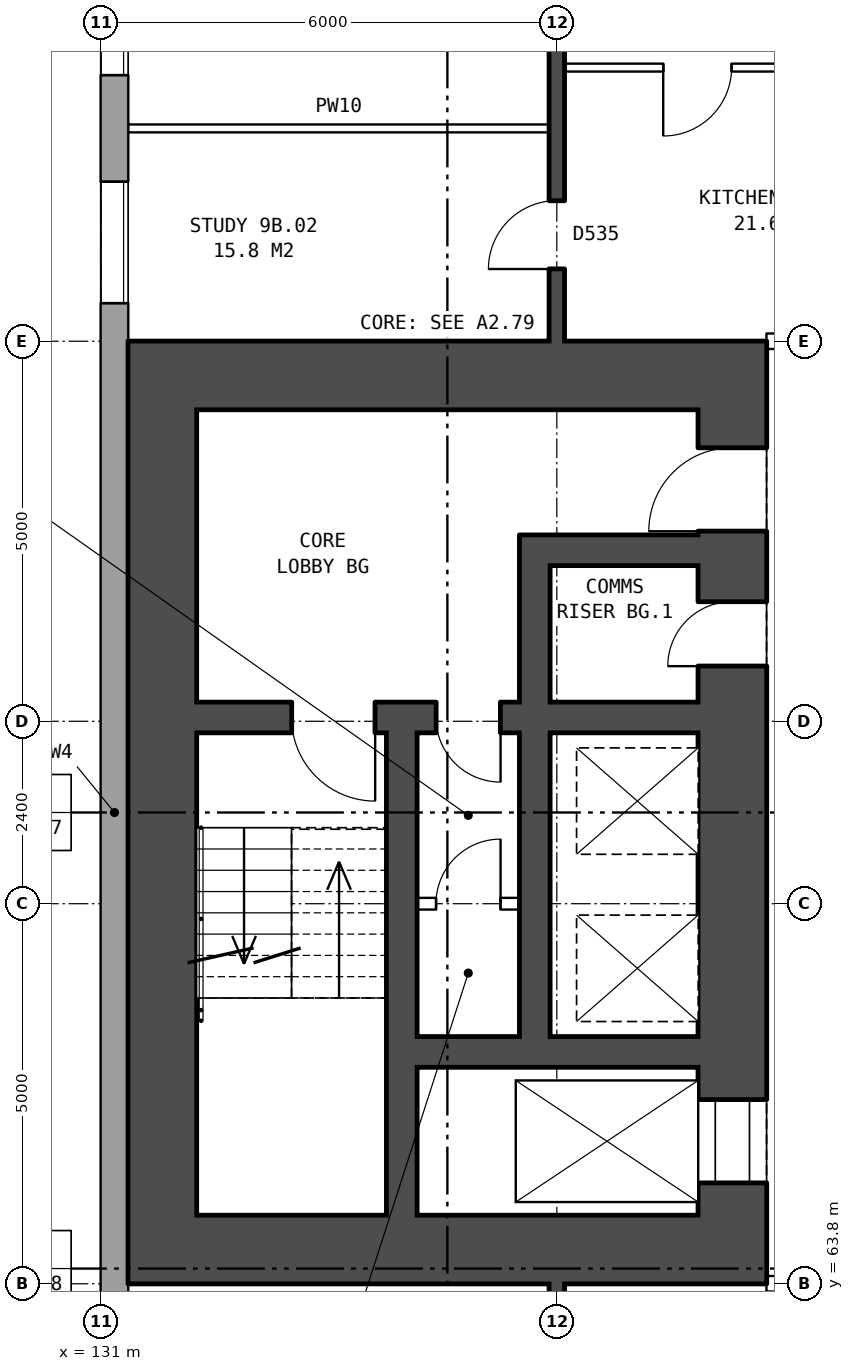
"""IFC4 building model, lengths in metres.
Left out: names, types, materials, properties, quantities, classifications, styles, units other than length and angle.
Written with IfcOpenShell. Run it as: python <this file> out.ifc"""

import sys

from ifc_helpers import new_model, si_unit, direction, frame, frame_2d, origin, place, context, subcontext, project, spatial, rectangle, extrude, element, fill, save


model = new_model("IFC4")
c1 = context("Model", 3, precision=1e-05, world=origin(), true_north=direction((0.0, 1.0)))
c2 = subcontext(c1, "Body", "Model", "MODEL_VIEW")
j1 = project(units=[si_unit("LENGTHUNIT", "METRE"), si_unit("PLANEANGLEUNIT", "RADIAN")], contexts=[c1])
p1 = place(None, origin())
s1 = spatial("IfcSite", under=j1, at=p1, CompositionType="ELEMENT")
p2 = place(p1, origin())
s2 = spatial("IfcBuilding", under=s1, at=p2, CompositionType="ELEMENT")
p3 = place(p2, frame((0.0, 0.0, 35.0)))
s3 = spatial("IfcBuildingStorey", under=s2, at=p3, CompositionType="ELEMENT", Elevation=35.0)
p4 = place(p3, frame((131.18, 82.925, 0.0), z_axis=(0.0, 0.0, 1.0), x_axis=(0.0, -1.0, 0.0)))
e1 = element("IfcWall", 1, at=p4, inside=s3, PredefinedType="STANDARD", context=c2, shape_type="SweptSolid", body=[
    extrude(rectangle(XDim=25.851, YDim=0.36, at=frame_2d((12.925, 0.0))), origin(), (0.0, 0.0, 1.0), 2.85),
])
p5 = place(p4, frame((1.625, 0.0, 0.8)))
e2 = element("IfcOpeningElement", 2, at=p5, cuts=e1, PredefinedType="OPENING", context=c2, shape_type="SweptSolid", body=[
    extrude(rectangle(XDim=1.6, YDim=1.8, at=frame_2d((0.8, 0.9))), frame((0.0, 0.19, 0.0), z_axis=(0.0, -1.0, 0.0), x_axis=(1.0, 0.0, 0.0)), (0.0, 0.0, 1.0), 0.38),
])
p6 = place(p4, frame((4.625, 0.0, 0.8)))
e3 = element("IfcOpeningElement", 3, at=p6, cuts=e1, PredefinedType="OPENING", context=c2, shape_type="SweptSolid", body=[
    extrude(rectangle(XDim=1.6, YDim=1.8, at=frame_2d((0.8, 0.9))), frame((0.0, 0.19, 0.0), z_axis=(0.0, -1.0, 0.0), x_axis=(1.0, 0.0, 0.0)), (0.0, 0.0, 1.0), 0.38),
])
p7 = place(p4, frame((19.625, 0.0, 0.8)))
e4 = element("IfcOpeningElement", 4, at=p7, cuts=e1, PredefinedType="OPENING", context=c2, shape_type="SweptSolid", body=[
    extrude(rectangle(XDim=1.6, YDim=1.8, at=frame_2d((0.8, 0.9))), frame((0.0, 0.19, 0.0), z_axis=(0.0, -1.0, 0.0), x_axis=(1.0, 0.0, 0.0)), (0.0, 0.0, 1.0), 0.38),
])
p8 = place(p4, frame((22.625, 0.0, 0.8)))
e5 = element("IfcOpeningElement", 5, at=p8, cuts=e1, PredefinedType="OPENING", context=c2, shape_type="SweptSolid", body=[
    extrude(rectangle(XDim=1.6, YDim=1.8, at=frame_2d((0.8, 0.9))), frame((0.0, 0.19, 0.0), z_axis=(0.0, -1.0, 0.0), x_axis=(1.0, 0.0, 0.0)), (0.0, 0.0, 1.0), 0.38),
])
p9 = place(p3, frame((139.31, 64.7, 0.0), z_axis=(0.0, 0.0, 1.0), x_axis=(0.0, 1.0, 0.0)))
e6 = element("IfcWall", 6, at=p9, inside=s3, PredefinedType="SHEAR", context=c2, shape_type="SweptSolid", body=[
    extrude(rectangle(XDim=10.6, YDim=0.9, at=frame_2d((5.3, 0.0))), origin(), (0.0, 0.0, 1.0), 2.85),
])
p10 = place(p9, frame((0.425, 0.0, 0.0)))
e7 = element("IfcOpeningElement", 7, at=p10, cuts=e6, PredefinedType="OPENING", context=c2, shape_type="SweptSolid", body=[
    extrude(rectangle(XDim=1.1, YDim=2.1, at=frame_2d((0.55, 1.05))), frame((0.0, 0.46, 0.0), z_axis=(0.0, -1.0, 0.0), x_axis=(1.0, 0.0, 0.0)), (0.0, 0.0, 1.0), 0.92),
])
p11 = place(p9, frame((9.0, 0.0, 0.0)))
e8 = element("IfcOpeningElement", 8, at=p11, cuts=e6, PredefinedType="OPENING", context=c2, shape_type="SweptSolid", body=[
    extrude(rectangle(XDim=1.1, YDim=2.1, at=frame_2d((0.55, 1.05))), frame((0.0, 0.46, 0.0), z_axis=(0.0, -1.0, 0.0), x_axis=(1.0, 0.0, 0.0)), (0.0, 0.0, 1.0), 0.92),
])
p12 = place(p9, frame((7.225, 0.0, 0.0)))
e9 = element("IfcOpeningElement", 9, at=p12, cuts=e6, PredefinedType="OPENING", context=c2, shape_type="SweptSolid", body=[
    extrude(rectangle(XDim=0.85, YDim=2.1, at=frame_2d((0.425, 1.05))), frame((0.0, 0.46, 0.0), z_axis=(0.0, -1.0, 0.0), x_axis=(1.0, 0.0, 0.0)), (0.0, 0.0, 1.0), 0.92),
])
p13 = place(p3, frame((131.81, 64.7, 0.0), z_axis=(0.0, 0.0, 1.0), x_axis=(0.0, 1.0, 0.0)))
e10 = element("IfcWall", 10, at=p13, inside=s3, PredefinedType="SHEAR", context=c2, shape_type="SweptSolid", body=[
    extrude(rectangle(XDim=10.6, YDim=0.9, at=frame_2d((5.3, 0.0))), origin(), (0.0, 0.0, 1.0), 2.85),
])
for number, where, z_axis, x_axis in (
    (11, (139.76, 64.25, 0.0), (0.0, 0.0, 1.0), (-1.0, 0.0, 0.0)),
    (12, (139.76, 75.75, 0.0), (0.0, 0.0, 1.0), (-1.0, 0.0, 0.0)),
):
    element("IfcWall", number, at=place(p3, frame(where, z_axis=z_axis, x_axis=x_axis)), inside=s3, PredefinedType="SHEAR", context=c2, shape_type="SweptSolid", body=[
        extrude(rectangle(XDim=8.4, YDim=0.9, at=frame_2d((4.2, 0.0))), origin(), (0.0, 0.0, 1.0), 2.85),
    ])
p14 = place(p3, frame((138.86, 66.85, 0.0), z_axis=(0.0, 0.0, 1.0), x_axis=(-1.0, 0.0, 0.0)))
e13 = element("IfcWall", 13, at=p14, inside=s3, PredefinedType="SHEAR", context=c2, shape_type="SweptSolid", body=[
    extrude(rectangle(XDim=3.7, YDim=0.4, at=frame_2d((1.85, 0.0))), origin(), (0.0, 0.0, 1.0), 2.85),
])
p15 = place(p3, frame((136.51, 68.8, 0.0), z_axis=(0.0, 0.0, 1.0), x_axis=(-1.0, 0.0, 0.0)))
e14 = element("IfcWall", 14, at=p15, inside=s3, PredefinedType="PARTITIONING", context=c2, shape_type="SweptSolid", body=[
    extrude(rectangle(XDim=1.35, YDim=0.15, at=frame_2d((0.675, 0.0))), origin(), (0.0, 0.0, 1.0), 2.85),
])
p16 = place(p15, frame((0.25, 0.0, 0.0)))
e15 = element("IfcOpeningElement", 15, at=p16, cuts=e14, PredefinedType="OPENING", context=c2, shape_type="SweptSolid", body=[
    extrude(rectangle(XDim=0.85, YDim=2.1, at=frame_2d((0.425, 1.05))), frame((0.0, 0.085, 0.0), z_axis=(0.0, -1.0, 0.0), x_axis=(1.0, 0.0, 0.0)), (0.0, 0.0, 1.0), 0.17),
])
p17 = place(p3, frame((138.86, 71.25, 0.0), z_axis=(0.0, 0.0, 1.0), x_axis=(-1.0, 0.0, 0.0)))
e16 = element("IfcWall", 16, at=p17, inside=s3, PredefinedType="SHEAR", context=c2, shape_type="SweptSolid", body=[
    extrude(rectangle(XDim=6.6, YDim=0.4, at=frame_2d((3.3, 0.0))), origin(), (0.0, 0.0, 1.0), 2.85),
])
p18 = place(p17, frame((4.25, 0.0, 0.0)))
e17 = element("IfcOpeningElement", 17, at=p18, cuts=e16, PredefinedType="OPENING", context=c2, shape_type="SweptSolid", body=[
    extrude(rectangle(XDim=1.1, YDim=2.1, at=frame_2d((0.55, 1.05))), frame((0.0, 0.21, 0.0), z_axis=(0.0, -1.0, 0.0), x_axis=(1.0, 0.0, 0.0)), (0.0, 0.0, 1.0), 0.42),
])
p19 = place(p17, frame((2.6, 0.0, 0.0)))
e18 = element("IfcOpeningElement", 18, at=p19, cuts=e16, PredefinedType="OPENING", context=c2, shape_type="SweptSolid", body=[
    extrude(rectangle(XDim=0.85, YDim=2.1, at=frame_2d((0.425, 1.05))), frame((0.0, 0.21, 0.0), z_axis=(0.0, -1.0, 0.0), x_axis=(1.0, 0.0, 0.0)), (0.0, 0.0, 1.0), 0.42),
])
p20 = place(p3, frame((138.86, 73.45, 0.0), z_axis=(0.0, 0.0, 1.0), x_axis=(-1.0, 0.0, 0.0)))
e19 = element("IfcWall", 19, at=p20, inside=s3, PredefinedType="SHEAR", context=c2, shape_type="SweptSolid", body=[
    extrude(rectangle(XDim=1.95, YDim=0.4, at=frame_2d((0.975, 0.0))), origin(), (0.0, 0.0, 1.0), 2.85),
])
p21 = place(p3, frame((136.71, 67.05, 0.0), z_axis=(0.0, 0.0, 1.0), x_axis=(0.0, 1.0, 0.0)))
e20 = element("IfcWall", 20, at=p21, inside=s3, PredefinedType="SHEAR", context=c2, shape_type="SweptSolid", body=[
    extrude(rectangle(XDim=4.0, YDim=0.4, at=frame_2d((2.0, 0.0))), origin(), (0.0, 0.0, 1.0), 2.85),
])
p22 = place(p3, frame((136.71, 71.45, 0.0), z_axis=(0.0, 0.0, 1.0), x_axis=(0.0, 1.0, 0.0)))
e21 = element("IfcWall", 21, at=p22, inside=s3, PredefinedType="SHEAR", context=c2, shape_type="SweptSolid", body=[
    extrude(rectangle(XDim=2.2, YDim=0.4, at=frame_2d((1.1, 0.0))), origin(), (0.0, 0.0, 1.0), 2.85),
])
p23 = place(p3, frame((134.96, 64.7, 0.0), z_axis=(0.0, 0.0, 1.0), x_axis=(0.0, 1.0, 0.0)))
e22 = element("IfcWall", 22, at=p23, inside=s3, PredefinedType="SHEAR", context=c2, shape_type="SweptSolid", body=[
    extrude(rectangle(XDim=6.35, YDim=0.4, at=frame_2d((3.175, 0.0))), origin(), (0.0, 0.0, 1.0), 2.85),
])
p24 = place(p3, frame((139.76, 63.8, 0.0), z_axis=(0.0, 0.0, 1.0), x_axis=(1.0, 0.0, 0.0)))
e23 = element("IfcWall", 23, at=p24, inside=s3, PredefinedType="PARTITIONING", context=c2, shape_type="SweptSolid", body=[
    extrude(rectangle(XDim=3.0, YDim=0.2, at=frame_2d((1.5, 0.0))), origin(), (0.0, 0.0, 1.0), 2.85),
])
p25 = place(p24, frame((1.0, 0.0, 0.0)))
e24 = element("IfcOpeningElement", 24, at=p25, cuts=e23, PredefinedType="OPENING", context=c2, shape_type="SweptSolid", body=[
    extrude(rectangle(XDim=1.0, YDim=2.1, at=frame_2d((0.5, 1.05))), frame((0.0, 0.11, 0.0), z_axis=(0.0, -1.0, 0.0), x_axis=(1.0, 0.0, 0.0)), (0.0, 0.0, 1.0), 0.22),
])
p26 = place(p3, frame((139.76, 76.2, 0.0), z_axis=(0.0, 0.0, 1.0), x_axis=(1.0, 0.0, 0.0)))
e25 = element("IfcWall", 25, at=p26, inside=s3, PredefinedType="PARTITIONING", context=c2, shape_type="SweptSolid", body=[
    extrude(rectangle(XDim=3.0, YDim=0.2, at=frame_2d((1.5, 0.0))), origin(), (0.0, 0.0, 1.0), 2.85),
])
p27 = place(p26, frame((1.0, 0.0, 0.0)))
e26 = element("IfcOpeningElement", 26, at=p27, cuts=e25, PredefinedType="OPENING", context=c2, shape_type="SweptSolid", body=[
    extrude(rectangle(XDim=1.0, YDim=2.1, at=frame_2d((0.5, 1.05))), frame((0.0, 0.11, 0.0), z_axis=(0.0, -1.0, 0.0), x_axis=(1.0, 0.0, 0.0)), (0.0, 0.0, 1.0), 0.22),
])
p28 = place(p3, frame((131.36, 79.0, 0.0), z_axis=(0.0, 0.0, 1.0), x_axis=(1.0, 0.0, 0.0)))
e27 = element("IfcWall", 27, at=p28, inside=s3, PredefinedType="PARTITIONING", context=c2, shape_type="SweptSolid", body=[
    extrude(rectangle(XDim=5.54, YDim=0.1, at=frame_2d((2.77, 0.0))), origin(), (0.0, 0.0, 1.0), 2.85),
])
p29 = place(p3, frame((137.1, 79.8, 0.0), z_axis=(0.0, 0.0, 1.0), x_axis=(1.0, 0.0, 0.0)))
e28 = element("IfcWall", 28, at=p29, inside=s3, PredefinedType="PARTITIONING", context=c2, shape_type="SweptSolid", body=[
    extrude(rectangle(XDim=5.8, YDim=0.1, at=frame_2d((2.9, 0.0))), origin(), (0.0, 0.0, 1.0), 2.85),
])
p30 = place(p29, frame((1.3, 0.0, 0.0)))
e29 = element("IfcOpeningElement", 29, at=p30, cuts=e28, PredefinedType="OPENING", context=c2, shape_type="SweptSolid", body=[
    extrude(rectangle(XDim=0.9, YDim=2.1, at=frame_2d((0.45, 1.05))), frame((0.0, 0.06, 0.0), z_axis=(0.0, -1.0, 0.0), x_axis=(1.0, 0.0, 0.0)), (0.0, 0.0, 1.0), 0.12),
])
p31 = place(p29, frame((4.2, 0.0, 0.0)))
e30 = element("IfcOpeningElement", 30, at=p31, cuts=e28, PredefinedType="OPENING", context=c2, shape_type="SweptSolid", body=[
    extrude(rectangle(XDim=0.9, YDim=2.1, at=frame_2d((0.45, 1.05))), frame((0.0, 0.06, 0.0), z_axis=(0.0, -1.0, 0.0), x_axis=(1.0, 0.0, 0.0)), (0.0, 0.0, 1.0), 0.12),
])
p32 = place(p3, frame((137.0, 54.36, 0.0), z_axis=(0.0, 0.0, 1.0), x_axis=(0.0, 1.0, 0.0)))
e31 = element("IfcWall", 31, at=p32, inside=s3, PredefinedType="SOLIDWALL", context=c2, shape_type="SweptSolid", body=[
    extrude(rectangle(XDim=9.44, YDim=0.2, at=frame_2d((4.72, 0.0))), origin(), (0.0, 0.0, 1.0), 2.85),
])
p33 = place(p32, frame((7.04, 0.0, 0.0)))
e32 = element("IfcOpeningElement", 32, at=p33, cuts=e31, PredefinedType="OPENING", context=c2, shape_type="SweptSolid", body=[
    extrude(rectangle(XDim=0.9, YDim=2.1, at=frame_2d((0.45, 1.05))), frame((0.0, 0.11, 0.0), z_axis=(0.0, -1.0, 0.0), x_axis=(1.0, 0.0, 0.0)), (0.0, 0.0, 1.0), 0.22),
])
p34 = place(p3, frame((137.0, 76.2, 0.0), z_axis=(0.0, 0.0, 1.0), x_axis=(0.0, 1.0, 0.0)))
e33 = element("IfcWall", 33, at=p34, inside=s3, PredefinedType="SOLIDWALL", context=c2, shape_type="SweptSolid", body=[
    extrude(rectangle(XDim=9.44, YDim=0.2, at=frame_2d((4.72, 0.0))), origin(), (0.0, 0.0, 1.0), 2.85),
])
p35 = place(p34, frame((6.07, 0.0, 0.0)))
e34 = element("IfcOpeningElement", 34, at=p35, cuts=e33, PredefinedType="OPENING", context=c2, shape_type="SweptSolid", body=[
    extrude(rectangle(XDim=0.9, YDim=2.1, at=frame_2d((0.45, 1.05))), frame((0.0, 0.11, 0.0), z_axis=(0.0, -1.0, 0.0), x_axis=(1.0, 0.0, 0.0)), (0.0, 0.0, 1.0), 0.22),
])
p36 = place(p34, frame((0.95, 0.0, 0.0)))
e35 = element("IfcOpeningElement", 35, at=p36, cuts=e33, PredefinedType="OPENING", context=c2, shape_type="SweptSolid", body=[
    extrude(rectangle(XDim=0.9, YDim=2.1, at=frame_2d((0.45, 1.05))), frame((0.0, 0.11, 0.0), z_axis=(0.0, -1.0, 0.0), x_axis=(1.0, 0.0, 0.0)), (0.0, 0.0, 1.0), 0.22),
])
p37 = place(p5, origin())
e36 = element("IfcWindow", 36, at=p37, inside=s3, PartitioningType="SINGLE_PANEL", PredefinedType="WINDOW", context=c2, shape_type="SweptSolid", body=[
    extrude(rectangle(XDim=1.6, YDim=1.8, at=frame_2d((0.8, 0.9))), frame((0.0, 0.15, 0.0), z_axis=(0.0, -1.0, 0.0), x_axis=(1.0, 0.0, 0.0)), (0.0, 0.0, 1.0), 0.06),
])
fill(e2, e36)
p38 = place(p6, origin())
e37 = element("IfcWindow", 37, at=p38, inside=s3, PartitioningType="SINGLE_PANEL", PredefinedType="WINDOW", context=c2, shape_type="SweptSolid", body=[
    extrude(rectangle(XDim=1.6, YDim=1.8, at=frame_2d((0.8, 0.9))), frame((0.0, 0.15, 0.0), z_axis=(0.0, -1.0, 0.0), x_axis=(1.0, 0.0, 0.0)), (0.0, 0.0, 1.0), 0.06),
])
fill(e3, e37)
p39 = place(p10, origin())
e38 = element("IfcDoor", 38, at=p39, inside=s3, OperationType="DOUBLE_DOOR_SLIDING", PredefinedType="DOOR", context=c2, shape_type="SweptSolid", body=[
    extrude(rectangle(XDim=1.1, YDim=2.1, at=frame_2d((0.55, 1.05))), frame((0.0, 0.435, 0.0), z_axis=(0.0, -1.0, 0.0), x_axis=(1.0, 0.0, 0.0)), (0.0, 0.0, 1.0), 0.05),
])
fill(e7, e38)
p40 = place(p11, origin())
e39 = element("IfcDoor", 39, at=p40, inside=s3, OperationType="SINGLE_SWING_LEFT", PredefinedType="DOOR", context=c2, shape_type="SweptSolid", body=[
    extrude(rectangle(XDim=1.1, YDim=2.1, at=frame_2d((0.55, 1.05))), frame((0.0, 0.435, 0.0), z_axis=(0.0, -1.0, 0.0), x_axis=(1.0, 0.0, 0.0)), (0.0, 0.0, 1.0), 0.05),
])
fill(e8, e39)
p41 = place(p18, origin())
e40 = element("IfcDoor", 40, at=p41, inside=s3, OperationType="SINGLE_SWING_LEFT", PredefinedType="DOOR", context=c2, shape_type="SweptSolid", body=[
    extrude(rectangle(XDim=1.1, YDim=2.1, at=frame_2d((0.55, 1.05))), frame((0.0, 0.025, 0.0), z_axis=(0.0, -1.0, 0.0), x_axis=(1.0, 0.0, 0.0)), (0.0, 0.0, 1.0), 0.05),
])
fill(e17, e40)
p42 = place(p12, origin())
e41 = element("IfcDoor", 41, at=p42, inside=s3, OperationType="SINGLE_SWING_LEFT", PredefinedType="DOOR", context=c2, shape_type="SweptSolid", body=[
    extrude(rectangle(XDim=0.85, YDim=2.1, at=frame_2d((0.425, 1.05))), frame((0.0, 0.435, 0.0), z_axis=(0.0, -1.0, 0.0), x_axis=(1.0, 0.0, 0.0)), (0.0, 0.0, 1.0), 0.05),
])
fill(e9, e41)
p43 = place(p19, origin())
e42 = element("IfcDoor", 42, at=p43, inside=s3, OperationType="SINGLE_SWING_LEFT", PredefinedType="DOOR", context=c2, shape_type="SweptSolid", body=[
    extrude(rectangle(XDim=0.85, YDim=2.1, at=frame_2d((0.425, 1.05))), frame((0.0, 0.025, 0.0), z_axis=(0.0, -1.0, 0.0), x_axis=(1.0, 0.0, 0.0)), (0.0, 0.0, 1.0), 0.05),
])
fill(e18, e42)
p44 = place(p16, frame((0.85, 0.0, 0.0), z_axis=(0.0, 0.0, 1.0), x_axis=(-1.0, 0.0, 0.0)))
e43 = element("IfcDoor", 43, at=p44, inside=s3, OperationType="SINGLE_SWING_RIGHT", PredefinedType="DOOR", context=c2, shape_type="SweptSolid", body=[
    extrude(rectangle(XDim=0.85, YDim=2.1, at=frame_2d((0.425, 1.05))), frame((0.0, 0.025, 0.0), z_axis=(0.0, -1.0, 0.0), x_axis=(1.0, 0.0, 0.0)), (0.0, 0.0, 1.0), 0.05),
])
fill(e15, e43)
p45 = place(p36, origin())
e44 = element("IfcDoor", 44, at=p45, inside=s3, OperationType="SINGLE_SWING_LEFT", PredefinedType="DOOR", context=c2, shape_type="SweptSolid", body=[
    extrude(rectangle(XDim=0.9, YDim=2.1, at=frame_2d((0.45, 1.05))), frame((0.0, 0.025, 0.0), z_axis=(0.0, -1.0, 0.0), x_axis=(1.0, 0.0, 0.0)), (0.0, 0.0, 1.0), 0.05),
])
fill(e35, e44)
p46 = place(p30, frame((0.9, 0.0, 0.0), z_axis=(0.0, 0.0, 1.0), x_axis=(-1.0, 0.0, 0.0)))
e45 = element("IfcDoor", 45, at=p46, inside=s3, OperationType="SINGLE_SWING_RIGHT", PredefinedType="DOOR", context=c2, shape_type="SweptSolid", body=[
    extrude(rectangle(XDim=0.9, YDim=2.1, at=frame_2d((0.45, 1.05))), frame((0.0, 0.025, 0.0), z_axis=(0.0, -1.0, 0.0), x_axis=(1.0, 0.0, 0.0)), (0.0, 0.0, 1.0), 0.05),
])
fill(e29, e45)
save(model, sys.argv[1])
